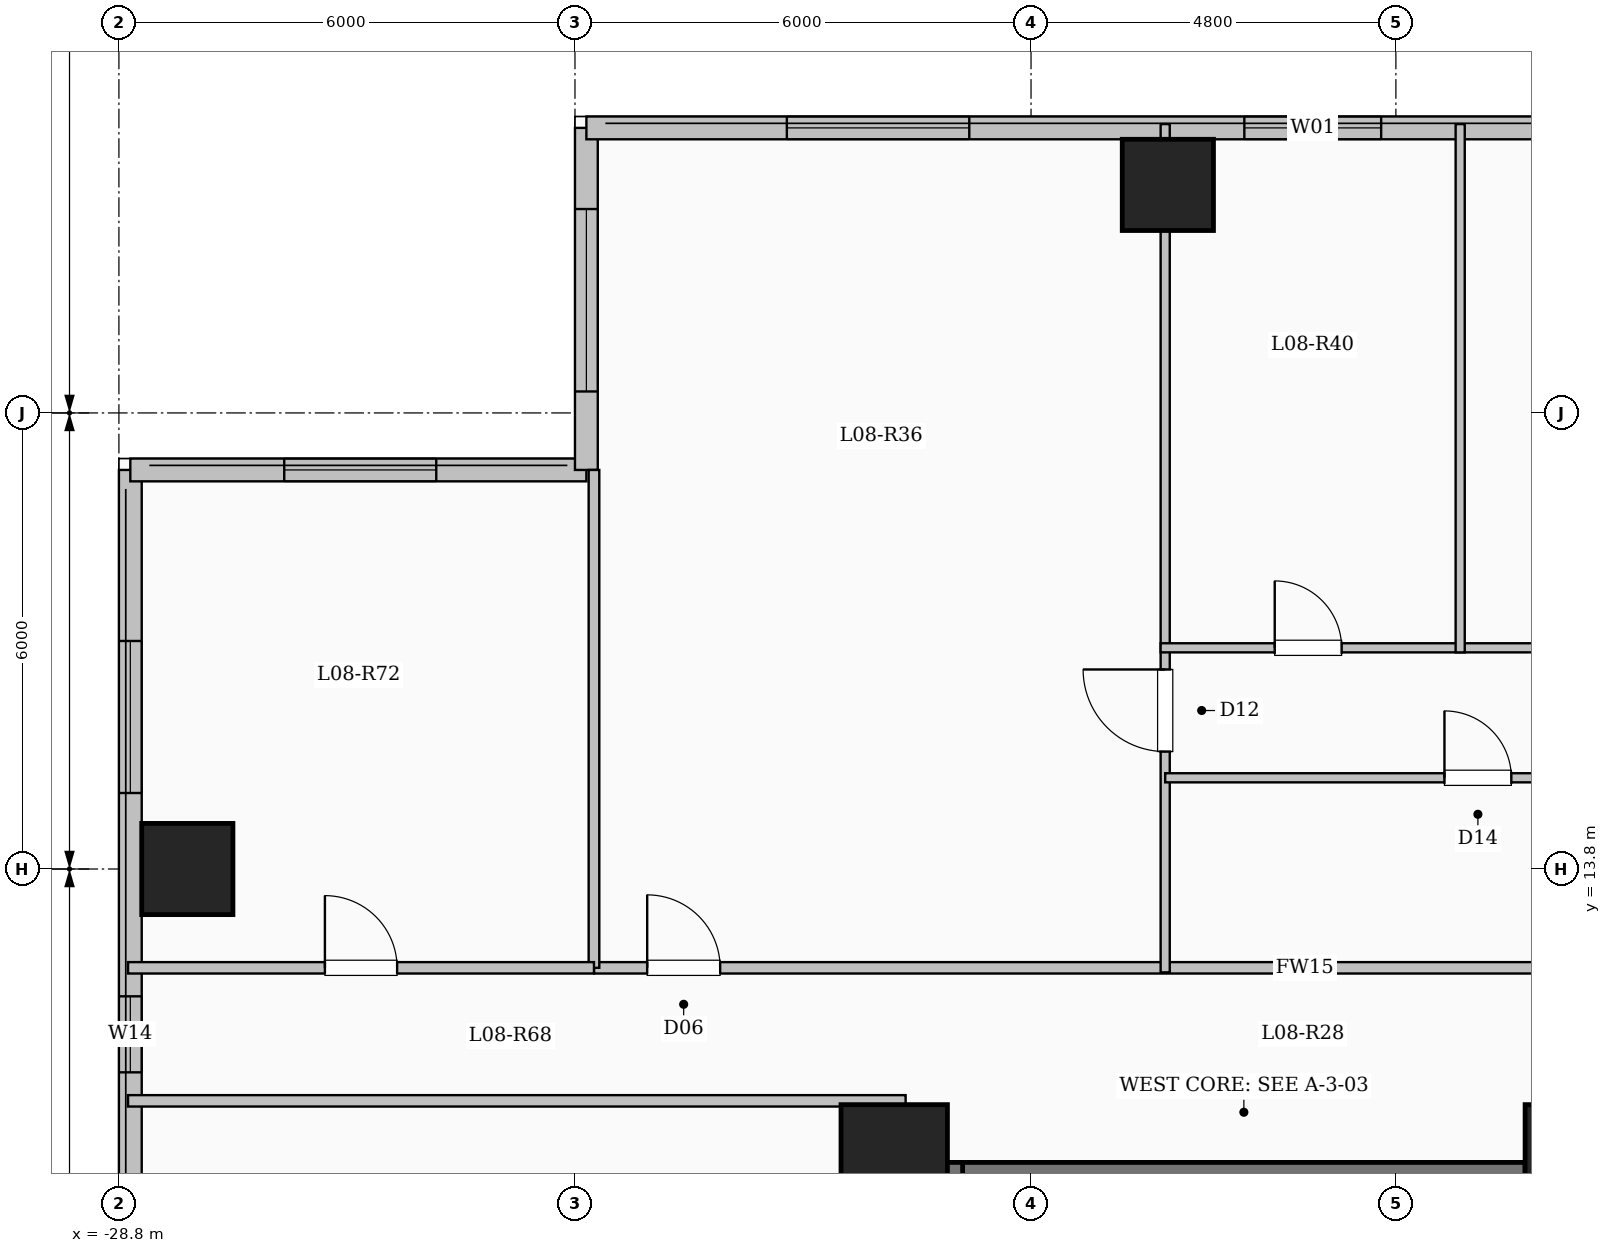
"""IFC4 building model, lengths in metres.
Left out: names, types, materials, properties, quantities, classifications, styles, units other than length and angle.
Written with IfcOpenShell. Run it as: python <this file> out.ifc"""

import sys

from ifc_helpers import new_model, si_unit, direction, frame, frame_2d, origin, origin_2d, place, context, subcontext, project, spatial, rectangle, extrude, element, fill, save


model = new_model("IFC4")
c1 = context("Model", 3, precision=1e-05, world=origin(), true_north=direction((0.0, 1.0)))
c2 = subcontext(c1, "Body", "Model", "MODEL_VIEW")
j1 = project(units=[si_unit("LENGTHUNIT", "METRE"), si_unit("PLANEANGLEUNIT", "RADIAN")], contexts=[c1])
p1 = place(None, origin())
s1 = spatial("IfcSite", under=j1, at=p1, CompositionType="ELEMENT")
p2 = place(p1, origin())
s2 = spatial("IfcBuilding", under=s1, at=p2, CompositionType="ELEMENT")
p3 = place(p2, frame((0.0, 0.0, 34.05)))
s3 = spatial("IfcBuildingStorey", under=s2, at=p3, CompositionType="ELEMENT", Elevation=34.05)
for number, where, z_axis, x_axis in (
    (1, (-9.6, 10.0, 0.0), (0.0, 0.0, 1.0), (1.0, 0.0, 0.0)),
    (2, (-18.6, 10.0, 0.0), (0.0, 0.0, 1.0), (1.0, 0.0, 0.0)),
):
    element("IfcColumn", number, at=place(p3, frame(where, z_axis=z_axis, x_axis=x_axis)), inside=s3, PredefinedType="COLUMN", context=c2, shape_type="SweptSolid", body=[
        extrude(rectangle(XDim=1.4, YDim=1.4, at=origin_2d()), origin(), (0.0, 0.0, 1.0), 3.35),
    ])
for number, where, z_axis, x_axis in (
    (3, (-15.0, 22.8, 0.0), (0.0, 0.0, 1.0), (1.0, 0.0, 0.0)),
    (4, (-27.9, 13.8, 0.0), (0.0, 0.0, 1.0), (1.0, 0.0, 0.0)),
):
    element("IfcColumn", number, at=place(p3, frame(where, z_axis=z_axis, x_axis=x_axis)), inside=s3, PredefinedType="COLUMN", context=c2, shape_type="SweptSolid", body=[
        extrude(rectangle(XDim=1.2, YDim=1.2, at=origin_2d()), origin(), (0.0, 0.0, 1.0), 3.35),
    ])
p4 = place(p3, frame((-28.65, -19.05, 0.0), z_axis=(0.0, 0.0, 1.0), x_axis=(0.0, 1.0, 0.0)))
e5 = element("IfcWall", 5, at=p4, inside=s3, PredefinedType="SOLIDWALL", context=c2, shape_type="SweptSolid", body=[
    extrude(rectangle(XDim=38.1, YDim=0.3, at=frame_2d((19.05, 0.0))), origin(), (0.0, 0.0, 1.0), 3.1),
])
p5 = place(p4, frame((3.15, 0.0, 0.9)))
e6 = element("IfcOpeningElement", 6, at=p5, cuts=e5, PredefinedType="OPENING", context=c2, shape_type="SweptSolid", body=[
    extrude(rectangle(XDim=2.4, YDim=1.8, at=frame_2d((1.2, 0.9))), frame((0.0, 0.16, 0.0), z_axis=(0.0, -1.0, 0.0), x_axis=(1.0, 0.0, 0.0)), (0.0, 0.0, 1.0), 0.32),
])
p6 = place(p4, frame((9.542, 0.0, 0.9)))
e7 = element("IfcOpeningElement", 7, at=p6, cuts=e5, PredefinedType="OPENING", context=c2, shape_type="SweptSolid", body=[
    extrude(rectangle(XDim=1.5, YDim=1.65, at=frame_2d((0.75, 0.825))), frame((0.0, 0.16, 0.0), z_axis=(0.0, -1.0, 0.0), x_axis=(1.0, 0.0, 0.0)), (0.0, 0.0, 1.0), 0.32),
])
p7 = place(p4, frame((19.8, 0.0, 0.9)))
e8 = element("IfcOpeningElement", 8, at=p7, cuts=e5, PredefinedType="OPENING", context=c2, shape_type="SweptSolid", body=[
    extrude(rectangle(XDim=2.0, YDim=1.7, at=frame_2d((1.0, 0.85))), frame((0.0, 0.16, 0.0), z_axis=(0.0, -1.0, 0.0), x_axis=(1.0, 0.0, 0.0)), (0.0, 0.0, 1.0), 0.32),
])
p8 = place(p4, frame((30.175, 0.0, 0.95)))
e9 = element("IfcOpeningElement", 9, at=p8, cuts=e5, PredefinedType="OPENING", context=c2, shape_type="SweptSolid", body=[
    extrude(rectangle(XDim=1.0, YDim=1.5, at=frame_2d((0.5, 0.75))), frame((0.0, 0.16, 0.0), z_axis=(0.0, -1.0, 0.0), x_axis=(1.0, 0.0, 0.0)), (0.0, 0.0, 1.0), 0.32),
])
p9 = place(p4, frame((33.85, 0.0, 0.9)))
e10 = element("IfcOpeningElement", 10, at=p9, cuts=e5, PredefinedType="OPENING", context=c2, shape_type="SweptSolid", body=[
    extrude(rectangle(XDim=2.0, YDim=1.7, at=frame_2d((1.0, 0.85))), frame((0.0, 0.16, 0.0), z_axis=(0.0, -1.0, 0.0), x_axis=(1.0, 0.0, 0.0)), (0.0, 0.0, 1.0), 0.32),
])
p10 = place(p3, frame((-28.65, 19.05, 0.0), z_axis=(0.0, 0.0, 1.0), x_axis=(1.0, 0.0, 0.0)))
e11 = element("IfcWall", 11, at=p10, inside=s3, PredefinedType="SOLIDWALL", context=c2, shape_type="SweptSolid", body=[
    extrude(rectangle(XDim=6.0, YDim=0.3, at=frame_2d((3.0, 0.0))), origin(), (0.0, 0.0, 1.0), 3.1),
])
p11 = place(p10, frame((2.025, 0.0, 0.9)))
e12 = element("IfcOpeningElement", 12, at=p11, cuts=e11, PredefinedType="OPENING", context=c2, shape_type="SweptSolid", body=[
    extrude(rectangle(XDim=2.0, YDim=1.7, at=frame_2d((1.0, 0.85))), frame((0.0, 0.16, 0.0), z_axis=(0.0, -1.0, 0.0), x_axis=(1.0, 0.0, 0.0)), (0.0, 0.0, 1.0), 0.32),
])
p12 = place(p3, frame((-22.65, 19.05, 0.0), z_axis=(0.0, 0.0, 1.0), x_axis=(0.0, 1.0, 0.0)))
e13 = element("IfcWall", 13, at=p12, inside=s3, PredefinedType="SOLIDWALL", context=c2, shape_type="SweptSolid", body=[
    extrude(rectangle(XDim=4.5, YDim=0.3, at=frame_2d((2.25, 0.0))), origin(), (0.0, 0.0, 1.0), 3.1),
])
p13 = place(p12, frame((1.032, 0.0, 0.9)))
e14 = element("IfcOpeningElement", 14, at=p13, cuts=e13, PredefinedType="OPENING", context=c2, shape_type="SweptSolid", body=[
    extrude(rectangle(XDim=2.4, YDim=1.8, at=frame_2d((1.2, 0.9))), frame((0.0, 0.16, 0.0), z_axis=(0.0, -1.0, 0.0), x_axis=(1.0, 0.0, 0.0)), (0.0, 0.0, 1.0), 0.32),
])
p14 = place(p3, frame((-22.65, 23.55, 0.0), z_axis=(0.0, 0.0, 1.0), x_axis=(1.0, 0.0, 0.0)))
e15 = element("IfcWall", 15, at=p14, inside=s3, PredefinedType="SOLIDWALL", context=c2, shape_type="SweptSolid", body=[
    extrude(rectangle(XDim=15.3, YDim=0.3, at=frame_2d((7.65, 0.0))), origin(), (0.0, 0.0, 1.0), 3.1),
])
p15 = place(p14, frame((2.637, 0.0, 0.9)))
e16 = element("IfcOpeningElement", 16, at=p15, cuts=e15, PredefinedType="OPENING", context=c2, shape_type="SweptSolid", body=[
    extrude(rectangle(XDim=2.4, YDim=1.8, at=frame_2d((1.2, 0.9))), frame((0.0, 0.16, 0.0), z_axis=(0.0, -1.0, 0.0), x_axis=(1.0, 0.0, 0.0)), (0.0, 0.0, 1.0), 0.32),
])
p16 = place(p14, frame((8.656, 0.0, 0.9)))
e17 = element("IfcOpeningElement", 17, at=p16, cuts=e15, PredefinedType="OPENING", context=c2, shape_type="SweptSolid", body=[
    extrude(rectangle(XDim=1.8, YDim=1.65, at=frame_2d((0.9, 0.825))), frame((0.0, 0.16, 0.0), z_axis=(0.0, -1.0, 0.0), x_axis=(1.0, 0.0, 0.0)), (0.0, 0.0, 1.0), 0.32),
])
p17 = place(p14, frame((12.544, 0.0, 0.9)))
e18 = element("IfcOpeningElement", 18, at=p17, cuts=e15, PredefinedType="OPENING", context=c2, shape_type="SweptSolid", body=[
    extrude(rectangle(XDim=1.8, YDim=1.65, at=frame_2d((0.9, 0.825))), frame((0.0, 0.16, 0.0), z_axis=(0.0, -1.0, 0.0), x_axis=(1.0, 0.0, 0.0)), (0.0, 0.0, 1.0), 0.32),
])
p18 = place(p3, frame((-18.0, 9.79, 0.0), z_axis=(0.0, 0.0, 1.0), x_axis=(1.0, 0.0, 0.0)))
e19 = element("IfcWall", 19, at=p18, inside=s3, PredefinedType="SHEAR", context=c2, shape_type="SweptSolid", body=[
    extrude(rectangle(XDim=8.0, YDim=0.3, at=frame_2d((4.0, 0.0))), origin(), (0.0, 0.0, 1.0), 3.35),
])
for number, where, z_axis, x_axis in (
    (20, (-17.85, 6.35, 0.0), (0.0, 0.0, 1.0), (0.0, 1.0, 0.0)),
    (21, (-10.15, 6.35, 0.0), (0.0, 0.0, 1.0), (0.0, 1.0, 0.0)),
):
    element("IfcWall", number, at=place(p3, frame(where, z_axis=z_axis, x_axis=x_axis)), inside=s3, PredefinedType="SHEAR", context=c2, shape_type="SweptSolid", body=[
        extrude(rectangle(XDim=3.59, YDim=0.3, at=frame_2d((1.795, 0.0))), origin(), (0.0, 0.0, 1.0), 3.35),
    ])
p19 = place(p3, frame((-22.55, 12.5, 0.0), z_axis=(0.0, 0.0, 1.0), x_axis=(1.0, 0.0, 0.0)))
e22 = element("IfcWall", 22, at=p19, inside=s3, PredefinedType="PARTITIONING", context=c2, shape_type="SweptSolid", body=[
    extrude(rectangle(XDim=18.7, YDim=0.15, at=frame_2d((9.35, 0.0))), origin(), (0.0, 0.0, 1.0), 3.1),
])
p20 = place(p19, frame((0.7, 0.0, 0.0)))
e23 = element("IfcOpeningElement", 23, at=p20, cuts=e22, PredefinedType="OPENING", context=c2, shape_type="SweptSolid", body=[
    extrude(rectangle(XDim=0.96, YDim=2.15, at=frame_2d((0.48, 1.075))), frame((0.0, 0.085, 0.0), z_axis=(0.0, -1.0, 0.0), x_axis=(1.0, 0.0, 0.0)), (0.0, 0.0, 1.0), 0.17),
])
p21 = place(p3, frame((-15.035, 12.44, 0.0), z_axis=(0.0, 0.0, 1.0), x_axis=(0.0, 1.0, 0.0)))
e24 = element("IfcWall", 24, at=p21, inside=s3, PredefinedType="PARTITIONING", context=c2, shape_type="SweptSolid", body=[
    extrude(rectangle(XDim=11.16, YDim=0.12, at=frame_2d((5.58, 0.0))), origin(), (0.0, 0.0, 1.0), 2.435),
])
p22 = place(p21, frame((2.905, 0.0, 0.0)))
e25 = element("IfcOpeningElement", 25, at=p22, cuts=e24, PredefinedType="OPENING", context=c2, shape_type="SweptSolid", body=[
    extrude(rectangle(XDim=1.08, YDim=2.15, at=frame_2d((0.54, 1.075))), frame((0.0, 0.07, 0.0), z_axis=(0.0, -1.0, 0.0), x_axis=(1.0, 0.0, 0.0)), (0.0, 0.0, 1.0), 0.14),
])
p23 = place(p3, frame((-15.035, 15.0, 0.0), z_axis=(0.0, 0.0, 1.0), x_axis=(1.0, 0.0, 0.0)))
e26 = element("IfcWall", 26, at=p23, inside=s3, PredefinedType="PARTITIONING", context=c2, shape_type="SweptSolid", body=[
    extrude(rectangle(XDim=8.228, YDim=0.12, at=frame_2d((4.114, 0.0))), origin(), (0.0, 0.0, 1.0), 2.585),
])
p24 = place(p23, frame((3.674, 0.0, 0.0)))
e27 = element("IfcOpeningElement", 27, at=p24, cuts=e26, PredefinedType="OPENING", context=c2, shape_type="SweptSolid", body=[
    extrude(rectangle(XDim=0.88, YDim=2.1, at=frame_2d((0.44, 1.05))), frame((0.0, 0.07, 0.0), z_axis=(0.0, -1.0, 0.0), x_axis=(1.0, 0.0, 0.0)), (0.0, 0.0, 1.0), 0.14),
])
p25 = place(p3, frame((-15.095, 16.71, 0.0), z_axis=(0.0, 0.0, 1.0), x_axis=(1.0, 0.0, 0.0)))
e28 = element("IfcWall", 28, at=p25, inside=s3, PredefinedType="PARTITIONING", context=c2, shape_type="SweptSolid", body=[
    extrude(rectangle(XDim=15.705, YDim=0.12, at=frame_2d((7.853, 0.0))), origin(), (0.0, 0.0, 1.0), 2.585),
])
p26 = place(p25, frame((1.501, 0.0, 0.0)))
e29 = element("IfcOpeningElement", 29, at=p26, cuts=e28, PredefinedType="OPENING", context=c2, shape_type="SweptSolid", body=[
    extrude(rectangle(XDim=0.88, YDim=2.1, at=frame_2d((0.44, 1.05))), frame((0.0, 0.07, 0.0), z_axis=(0.0, -1.0, 0.0), x_axis=(1.0, 0.0, 0.0)), (0.0, 0.0, 1.0), 0.14),
])
p27 = place(p25, frame((5.382, 0.0, 0.0)))
e30 = element("IfcOpeningElement", 30, at=p27, cuts=e28, PredefinedType="OPENING", context=c2, shape_type="SweptSolid", body=[
    extrude(rectangle(XDim=0.88, YDim=2.1, at=frame_2d((0.44, 1.05))), frame((0.0, 0.07, 0.0), z_axis=(0.0, -1.0, 0.0), x_axis=(1.0, 0.0, 0.0)), (0.0, 0.0, 1.0), 0.14),
])
p28 = place(p25, frame((9.263, 0.0, 0.0)))
e31 = element("IfcOpeningElement", 31, at=p28, cuts=e28, PredefinedType="OPENING", context=c2, shape_type="SweptSolid", body=[
    extrude(rectangle(XDim=0.88, YDim=2.1, at=frame_2d((0.44, 1.05))), frame((0.0, 0.07, 0.0), z_axis=(0.0, -1.0, 0.0), x_axis=(1.0, 0.0, 0.0)), (0.0, 0.0, 1.0), 0.14),
])
p29 = place(p25, frame((13.144, 0.0, 0.0)))
e32 = element("IfcOpeningElement", 32, at=p29, cuts=e28, PredefinedType="OPENING", context=c2, shape_type="SweptSolid", body=[
    extrude(rectangle(XDim=0.88, YDim=2.1, at=frame_2d((0.44, 1.05))), frame((0.0, 0.07, 0.0), z_axis=(0.0, -1.0, 0.0), x_axis=(1.0, 0.0, 0.0)), (0.0, 0.0, 1.0), 0.14),
])
p30 = place(p3, frame((-11.154, 16.65, 0.0), z_axis=(0.0, 0.0, 1.0), x_axis=(0.0, 1.0, 0.0)))
e33 = element("IfcWall", 33, at=p30, inside=s3, PredefinedType="PARTITIONING", context=c2, shape_type="SweptSolid", body=[
    extrude(rectangle(XDim=6.95, YDim=0.12, at=frame_2d((3.475, 0.0))), origin(), (0.0, 0.0, 1.0), 3.1),
])
p31 = place(p3, frame((-28.68, 10.75, 0.0), z_axis=(0.0, 0.0, 1.0), x_axis=(1.0, 0.0, 0.0)))
e34 = element("IfcWall", 34, at=p31, inside=s3, PredefinedType="PARTITIONING", context=c2, shape_type="SweptSolid", body=[
    extrude(rectangle(XDim=10.23, YDim=0.15, at=frame_2d((5.115, 0.0))), origin(), (0.0, 0.0, 1.0), 3.1),
])
p32 = place(p3, frame((-22.55, 12.5, 0.0), z_axis=(0.0, 0.0, 1.0), x_axis=(0.0, 1.0, 0.0)))
e35 = element("IfcWall", 35, at=p32, inside=s3, PredefinedType="PARTITIONING", context=c2, shape_type="SweptSolid", body=[
    extrude(rectangle(XDim=6.55, YDim=0.14, at=frame_2d((3.275, 0.0))), origin(), (0.0, 0.0, 1.0), 3.1),
])
p33 = place(p3, frame((-28.68, 12.5, 0.0), z_axis=(0.0, 0.0, 1.0), x_axis=(1.0, 0.0, 0.0)))
e36 = element("IfcWall", 36, at=p33, inside=s3, PredefinedType="PARTITIONING", context=c2, shape_type="SweptSolid", body=[
    extrude(rectangle(XDim=6.13, YDim=0.15, at=frame_2d((3.065, 0.0))), origin(), (0.0, 0.0, 1.0), 3.1),
])
p34 = place(p33, frame((2.59, 0.0, 0.0)))
e37 = element("IfcOpeningElement", 37, at=p34, cuts=e36, PredefinedType="OPENING", context=c2, shape_type="SweptSolid", body=[
    extrude(rectangle(XDim=0.95, YDim=2.15, at=frame_2d((0.475, 1.075))), frame((0.0, 0.085, 0.0), z_axis=(0.0, -1.0, 0.0), x_axis=(1.0, 0.0, 0.0)), (0.0, 0.0, 1.0), 0.17),
])
p35 = place(p8, origin())
e38 = element("IfcWindow", 38, at=p35, inside=s3, PartitioningType="SINGLE_PANEL", PredefinedType="WINDOW", context=c2, shape_type="SweptSolid", body=[
    extrude(rectangle(XDim=1.0, YDim=1.5, at=frame_2d((0.5, 0.75))), frame((0.0, 0.03, 0.0), z_axis=(0.0, -1.0, 0.0), x_axis=(1.0, 0.0, 0.0)), (0.0, 0.0, 1.0), 0.06),
])
fill(e9, e38)
p36 = place(p9, origin())
e39 = element("IfcWindow", 39, at=p36, inside=s3, PartitioningType="SINGLE_PANEL", PredefinedType="WINDOW", context=c2, shape_type="SweptSolid", body=[
    extrude(rectangle(XDim=2.0, YDim=1.7, at=frame_2d((1.0, 0.85))), frame((0.0, 0.03, 0.0), z_axis=(0.0, -1.0, 0.0), x_axis=(1.0, 0.0, 0.0)), (0.0, 0.0, 1.0), 0.06),
])
fill(e10, e39)
p37 = place(p11, origin())
e40 = element("IfcWindow", 40, at=p37, inside=s3, PartitioningType="SINGLE_PANEL", PredefinedType="WINDOW", context=c2, shape_type="SweptSolid", body=[
    extrude(rectangle(XDim=2.0, YDim=1.7, at=frame_2d((1.0, 0.85))), frame((0.0, 0.03, 0.0), z_axis=(0.0, -1.0, 0.0), x_axis=(1.0, 0.0, 0.0)), (0.0, 0.0, 1.0), 0.06),
])
fill(e12, e40)
p38 = place(p13, origin())
e41 = element("IfcWindow", 41, at=p38, inside=s3, PartitioningType="SINGLE_PANEL", PredefinedType="WINDOW", context=c2, shape_type="SweptSolid", body=[
    extrude(rectangle(XDim=2.4, YDim=1.8, at=frame_2d((1.2, 0.9))), frame((0.0, 0.03, 0.0), z_axis=(0.0, -1.0, 0.0), x_axis=(1.0, 0.0, 0.0)), (0.0, 0.0, 1.0), 0.06),
])
fill(e14, e41)
p39 = place(p15, origin())
e42 = element("IfcWindow", 42, at=p39, inside=s3, PartitioningType="SINGLE_PANEL", PredefinedType="WINDOW", context=c2, shape_type="SweptSolid", body=[
    extrude(rectangle(XDim=2.4, YDim=1.8, at=frame_2d((1.2, 0.9))), frame((0.0, 0.03, 0.0), z_axis=(0.0, -1.0, 0.0), x_axis=(1.0, 0.0, 0.0)), (0.0, 0.0, 1.0), 0.06),
])
fill(e16, e42)
p40 = place(p16, origin())
e43 = element("IfcWindow", 43, at=p40, inside=s3, PartitioningType="SINGLE_PANEL", PredefinedType="WINDOW", context=c2, shape_type="SweptSolid", body=[
    extrude(rectangle(XDim=1.8, YDim=1.65, at=frame_2d((0.9, 0.825))), frame((0.0, 0.03, 0.0), z_axis=(0.0, -1.0, 0.0), x_axis=(1.0, 0.0, 0.0)), (0.0, 0.0, 1.0), 0.06),
])
fill(e17, e43)
p41 = place(p20, origin())
e44 = element("IfcDoor", 44, at=p41, inside=s3, OperationType="SINGLE_SWING_LEFT", PredefinedType="DOOR", context=c2, shape_type="SweptSolid", body=[
    extrude(rectangle(XDim=0.96, YDim=2.15, at=frame_2d((0.48, 1.075))), frame((0.0, 0.025, 0.0), z_axis=(0.0, -1.0, 0.0), x_axis=(1.0, 0.0, 0.0)), (0.0, 0.0, 1.0), 0.05),
])
fill(e23, e44)
p42 = place(p22, origin())
e45 = element("IfcDoor", 45, at=p42, inside=s3, OperationType="SINGLE_SWING_RIGHT", PredefinedType="DOOR", context=c2, shape_type="SweptSolid", body=[
    extrude(rectangle(XDim=1.08, YDim=2.15, at=frame_2d((0.54, 1.075))), frame((0.0, 0.025, 0.0), z_axis=(0.0, -1.0, 0.0), x_axis=(1.0, 0.0, 0.0)), (0.0, 0.0, 1.0), 0.05),
])
fill(e25, e45)
p43 = place(p24, origin())
e46 = element("IfcDoor", 46, at=p43, inside=s3, OperationType="SINGLE_SWING_LEFT", PredefinedType="DOOR", context=c2, shape_type="SweptSolid", body=[
    extrude(rectangle(XDim=0.88, YDim=2.1, at=frame_2d((0.44, 1.05))), frame((0.0, 0.025, 0.0), z_axis=(0.0, -1.0, 0.0), x_axis=(1.0, 0.0, 0.0)), (0.0, 0.0, 1.0), 0.05),
])
fill(e27, e46)
p44 = place(p26, origin())
e47 = element("IfcDoor", 47, at=p44, inside=s3, OperationType="SINGLE_SWING_LEFT", PredefinedType="DOOR", context=c2, shape_type="SweptSolid", body=[
    extrude(rectangle(XDim=0.88, YDim=2.1, at=frame_2d((0.44, 1.05))), frame((0.0, 0.025, 0.0), z_axis=(0.0, -1.0, 0.0), x_axis=(1.0, 0.0, 0.0)), (0.0, 0.0, 1.0), 0.05),
])
fill(e29, e47)
p45 = place(p34, origin())
e48 = element("IfcDoor", 48, at=p45, inside=s3, OperationType="SINGLE_SWING_LEFT", PredefinedType="DOOR", context=c2, shape_type="SweptSolid", body=[
    extrude(rectangle(XDim=0.95, YDim=2.15, at=frame_2d((0.475, 1.075))), frame((0.0, 0.025, 0.0), z_axis=(0.0, -1.0, 0.0), x_axis=(1.0, 0.0, 0.0)), (0.0, 0.0, 1.0), 0.05),
])
fill(e37, e48)
save(model, sys.argv[1])
